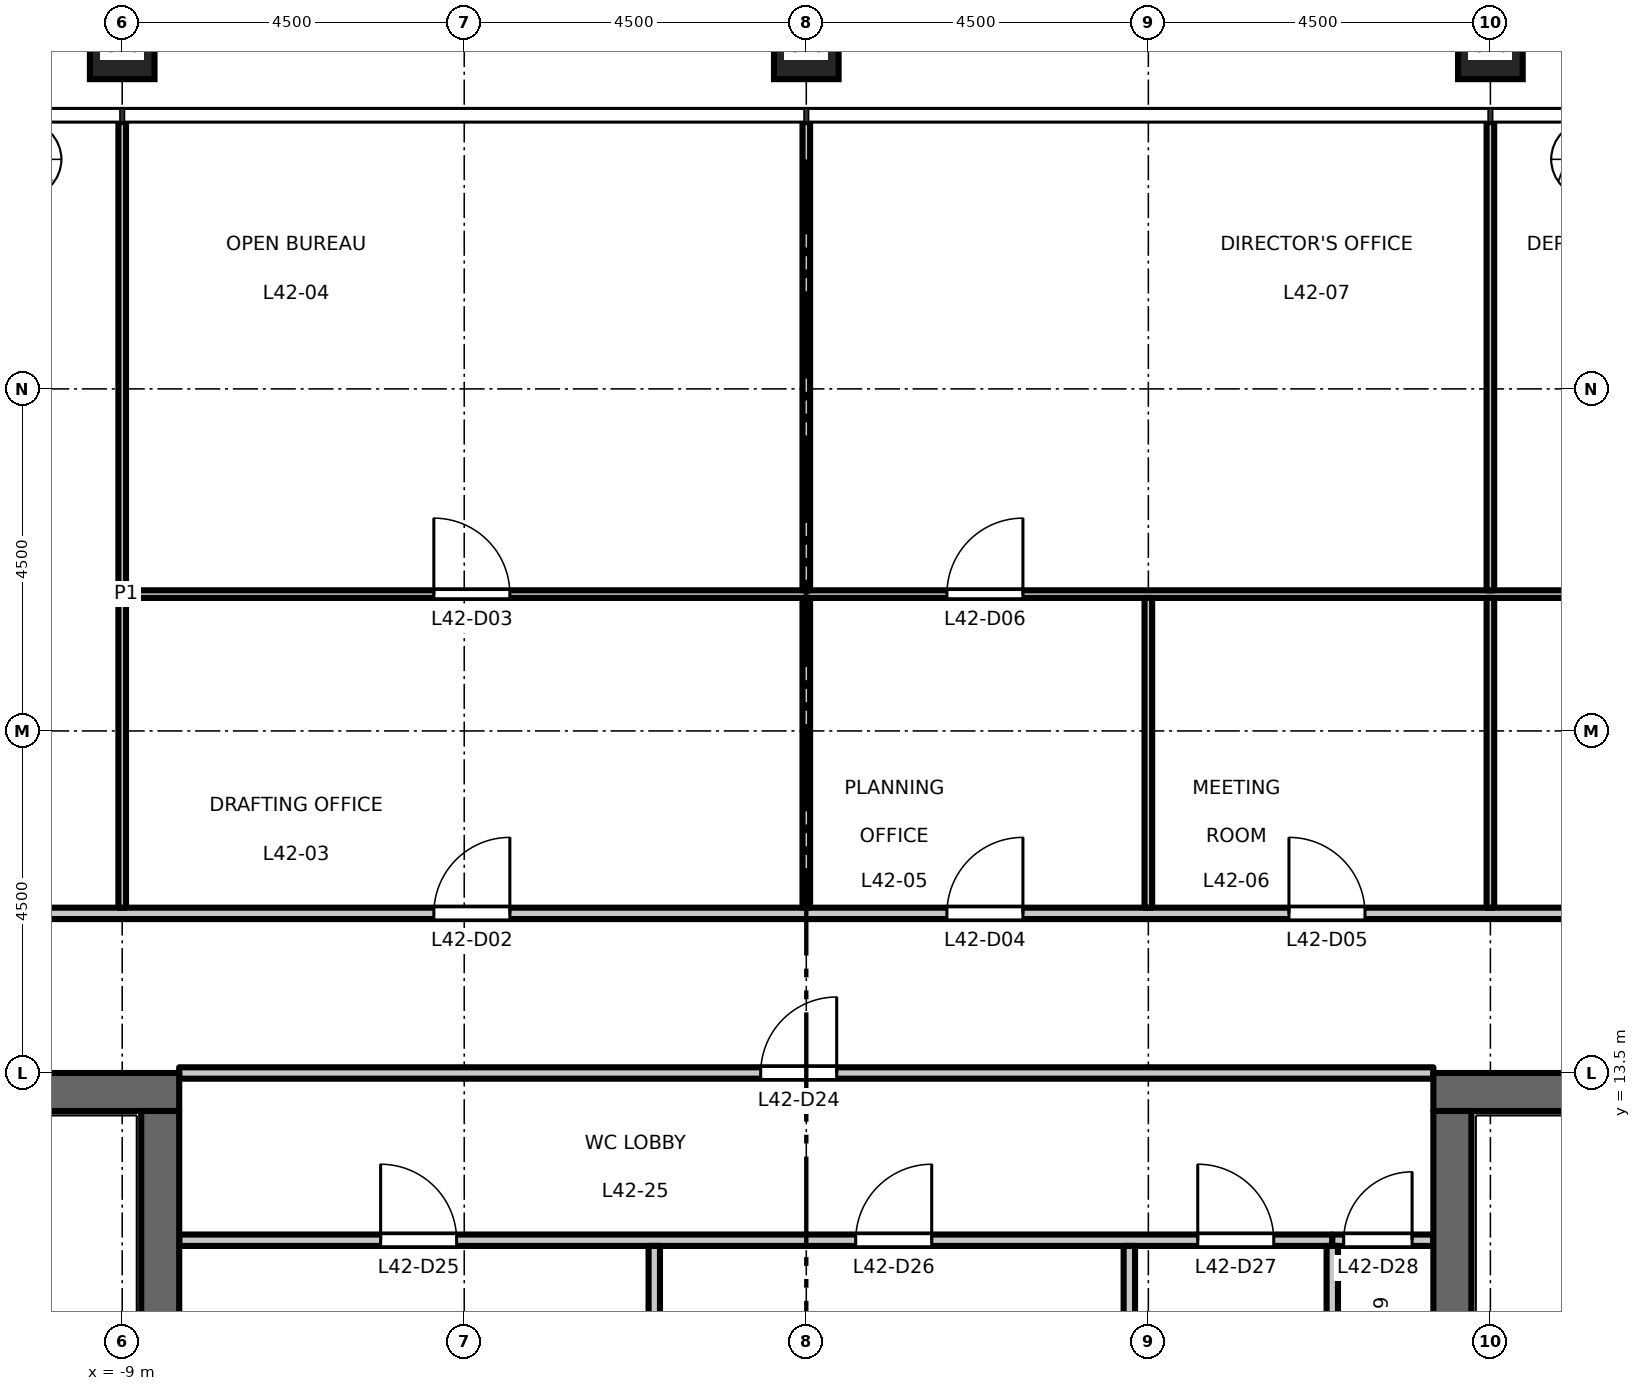
"""IFC4 building model, lengths in metres.
Left out: names, types, materials, properties, quantities, classifications, styles, units other than length and angle.
Written with IfcOpenShell. Run it as: python <this file> out.ifc"""

import sys

from ifc_helpers import new_model, si_unit, direction, frame, frame_2d, origin, origin_2d, place, context, subcontext, project, spatial, rectangle, hollow_rectangle, extrude, element, fill, save


model = new_model("IFC4")
c1 = context("Model", 3, precision=1e-05, world=origin(), true_north=direction((0.0, 1.0)))
c2 = subcontext(c1, "Body", "Model", "MODEL_VIEW")
j1 = project(units=[si_unit("LENGTHUNIT", "METRE"), si_unit("PLANEANGLEUNIT", "RADIAN")], contexts=[c1])
p1 = place(None, origin())
s1 = spatial("IfcSite", under=j1, at=p1, CompositionType="ELEMENT")
p2 = place(p1, origin())
s2 = spatial("IfcBuilding", under=s1, at=p2, CompositionType="ELEMENT")
p3 = place(p2, frame((0.0, 0.0, 197.2)))
s3 = spatial("IfcBuildingStorey", under=s2, at=p3, CompositionType="ELEMENT", Elevation=197.2)
for number, where, z_axis, x_axis in (
    (1, (9.0, 27.0, 0.0), (0.0, 0.0, 1.0), (1.0, 0.0, 0.0)),
    (2, (0.0, 27.0, 0.0), (0.0, 0.0, 1.0), (1.0, 0.0, 0.0)),
    (3, (-9.0, 27.0, 0.0), (0.0, 0.0, 1.0), (1.0, 0.0, 0.0)),
):
    element("IfcColumn", number, at=place(p3, frame(where, z_axis=z_axis, x_axis=x_axis)), inside=s3, PredefinedType="COLUMN", context=c2, shape_type="SweptSolid", body=[
        extrude(hollow_rectangle(XDim=0.85, YDim=0.85, WallThickness=0.05, at=origin_2d()), origin(), (0.0, 0.0, 1.0), 4.5),
    ])
p4 = place(p3, frame((-8.25, 13.25, 0.0), z_axis=(0.0, 0.0, 1.0), x_axis=(-1.0, 0.0, 0.0)))
e4 = element("IfcWall", 4, at=p4, inside=s3, PredefinedType="SHEAR", context=c2, shape_type="SweptSolid", body=[
    extrude(rectangle(XDim=13.5, YDim=0.5, at=frame_2d((6.75, 0.0))), origin(), (0.0, 0.0, 1.0), 4.35),
])
p5 = place(p3, frame((-8.5, -13.0, 0.0), z_axis=(0.0, 0.0, 1.0), x_axis=(0.0, 1.0, 0.0)))
e5 = element("IfcWall", 5, at=p5, inside=s3, PredefinedType="SHEAR", context=c2, shape_type="SweptSolid", body=[
    extrude(rectangle(XDim=26.0, YDim=0.5, at=frame_2d((13.0, 0.0))), origin(), (0.0, 0.0, 1.0), 4.35),
])
p6 = place(p3, frame((8.25, 13.25, 0.0), z_axis=(0.0, 0.0, 1.0), x_axis=(1.0, 0.0, 0.0)))
e6 = element("IfcWall", 6, at=p6, inside=s3, PredefinedType="SHEAR", context=c2, shape_type="SweptSolid", body=[
    extrude(rectangle(XDim=13.5, YDim=0.5, at=frame_2d((6.75, 0.0))), origin(), (0.0, 0.0, 1.0), 4.35),
])
p7 = place(p3, frame((8.5, -13.0, 0.0), z_axis=(0.0, 0.0, 1.0), x_axis=(0.0, 1.0, 0.0)))
e7 = element("IfcWall", 7, at=p7, inside=s3, PredefinedType="SHEAR", context=c2, shape_type="SweptSolid", body=[
    extrude(rectangle(XDim=26.0, YDim=0.5, at=frame_2d((13.0, 0.0))), origin(), (0.0, 0.0, 1.0), 4.35),
])
p8 = place(p3, frame((-8.25, 11.3, 0.0), z_axis=(0.0, 0.0, 1.0), x_axis=(1.0, 0.0, 0.0)))
e8 = element("IfcWall", 8, at=p8, inside=s3, PredefinedType="PARTITIONING", context=c2, shape_type="SweptSolid", body=[
    extrude(rectangle(XDim=15.17, YDim=0.15, at=frame_2d((7.585, 0.0))), origin(), (0.0, 0.0, 1.0), 4.35),
])
p9 = place(p8, frame((2.65, 0.0, 0.0)))
e9 = element("IfcOpeningElement", 9, at=p9, cuts=e8, PredefinedType="OPENING", context=c2, shape_type="SweptSolid", body=[
    extrude(rectangle(XDim=1.0, YDim=2.1, at=frame_2d((0.5, 1.05))), frame((0.0, 0.085, 0.0), z_axis=(0.0, -1.0, 0.0), x_axis=(1.0, 0.0, 0.0)), (0.0, 0.0, 1.0), 0.17),
])
p10 = place(p8, frame((8.9, 0.0, 0.0)))
e10 = element("IfcOpeningElement", 10, at=p10, cuts=e8, PredefinedType="OPENING", context=c2, shape_type="SweptSolid", body=[
    extrude(rectangle(XDim=1.0, YDim=2.1, at=frame_2d((0.5, 1.05))), frame((0.0, 0.085, 0.0), z_axis=(0.0, -1.0, 0.0), x_axis=(1.0, 0.0, 0.0)), (0.0, 0.0, 1.0), 0.17),
])
p11 = place(p8, frame((13.4, 0.0, 0.0)))
e11 = element("IfcOpeningElement", 11, at=p11, cuts=e8, PredefinedType="OPENING", context=c2, shape_type="SweptSolid", body=[
    extrude(rectangle(XDim=1.0, YDim=2.1, at=frame_2d((0.5, 1.05))), frame((0.0, 0.085, 0.0), z_axis=(0.0, -1.0, 0.0), x_axis=(1.0, 0.0, 0.0)), (0.0, 0.0, 1.0), 0.17),
])
p12 = place(p3, frame((6.92, 11.3, 0.0), z_axis=(0.0, 0.0, 1.0), x_axis=(1.0, 0.0, 0.0)))
e12 = element("IfcWall", 12, at=p12, inside=s3, PredefinedType="PARTITIONING", context=c2, shape_type="SweptSolid", body=[
    extrude(rectangle(XDim=1.33, YDim=0.15, at=frame_2d((0.665, 0.0))), origin(), (0.0, 0.0, 1.0), 4.35),
])
p13 = place(p12, frame((0.15, 0.0, 0.0)))
e13 = element("IfcOpeningElement", 13, at=p13, cuts=e12, PredefinedType="OPENING", context=c2, shape_type="SweptSolid", body=[
    extrude(rectangle(XDim=0.9, YDim=2.1, at=frame_2d((0.45, 1.05))), frame((0.0, 0.085, 0.0), z_axis=(0.0, -1.0, 0.0), x_axis=(1.0, 0.0, 0.0)), (0.0, 0.0, 1.0), 0.17),
])
p14 = place(p3, frame((-8.25, 13.5, 0.0), z_axis=(0.0, 0.0, 1.0), x_axis=(1.0, 0.0, 0.0)))
e14 = element("IfcWall", 14, at=p14, inside=s3, PredefinedType="PARTITIONING", context=c2, shape_type="SweptSolid", body=[
    extrude(rectangle(XDim=16.5, YDim=0.15, at=frame_2d((8.25, 0.0))), origin(), (0.0, 0.0, 1.0), 4.35),
])
p15 = place(p14, frame((7.65, 0.0, 0.0)))
e15 = element("IfcOpeningElement", 15, at=p15, cuts=e14, PredefinedType="OPENING", context=c2, shape_type="SweptSolid", body=[
    extrude(rectangle(XDim=1.0, YDim=2.1, at=frame_2d((0.5, 1.05))), frame((0.0, 0.085, 0.0), z_axis=(0.0, -1.0, 0.0), x_axis=(1.0, 0.0, 0.0)), (0.0, 0.0, 1.0), 0.17),
])
p16 = place(p3, frame((-26.01, 15.6, 0.0), z_axis=(0.0, 0.0, 1.0), x_axis=(1.0, 0.0, 0.0)))
e16 = element("IfcWall", 16, at=p16, inside=s3, PredefinedType="PARTITIONING", context=c2, shape_type="SweptSolid", body=[
    extrude(rectangle(XDim=52.02, YDim=0.15, at=frame_2d((26.01, 0.0))), origin(), (0.0, 0.0, 1.0), 4.35),
])
p17 = place(p16, frame((12.11, 0.0, 0.0)))
e17 = element("IfcOpeningElement", 17, at=p17, cuts=e16, PredefinedType="OPENING", context=c2, shape_type="SweptSolid", body=[
    extrude(rectangle(XDim=1.0, YDim=2.1, at=frame_2d((0.5, 1.05))), frame((0.0, 0.085, 0.0), z_axis=(0.0, -1.0, 0.0), x_axis=(1.0, 0.0, 0.0)), (0.0, 0.0, 1.0), 0.17),
])
p18 = place(p16, frame((21.11, 0.0, 0.0)))
e18 = element("IfcOpeningElement", 18, at=p18, cuts=e16, PredefinedType="OPENING", context=c2, shape_type="SweptSolid", body=[
    extrude(rectangle(XDim=1.0, YDim=2.1, at=frame_2d((0.5, 1.05))), frame((0.0, 0.085, 0.0), z_axis=(0.0, -1.0, 0.0), x_axis=(1.0, 0.0, 0.0)), (0.0, 0.0, 1.0), 0.17),
])
p19 = place(p16, frame((27.86, 0.0, 0.0)))
e19 = element("IfcOpeningElement", 19, at=p19, cuts=e16, PredefinedType="OPENING", context=c2, shape_type="SweptSolid", body=[
    extrude(rectangle(XDim=1.0, YDim=2.1, at=frame_2d((0.5, 1.05))), frame((0.0, 0.085, 0.0), z_axis=(0.0, -1.0, 0.0), x_axis=(1.0, 0.0, 0.0)), (0.0, 0.0, 1.0), 0.17),
])
p20 = place(p16, frame((32.36, 0.0, 0.0)))
e20 = element("IfcOpeningElement", 20, at=p20, cuts=e16, PredefinedType="OPENING", context=c2, shape_type="SweptSolid", body=[
    extrude(rectangle(XDim=1.0, YDim=2.1, at=frame_2d((0.5, 1.05))), frame((0.0, 0.085, 0.0), z_axis=(0.0, -1.0, 0.0), x_axis=(1.0, 0.0, 0.0)), (0.0, 0.0, 1.0), 0.17),
])
p21 = place(p16, frame((39.11, 0.0, 0.0)))
e21 = element("IfcOpeningElement", 21, at=p21, cuts=e16, PredefinedType="OPENING", context=c2, shape_type="SweptSolid", body=[
    extrude(rectangle(XDim=1.0, YDim=2.1, at=frame_2d((0.5, 1.05))), frame((0.0, 0.085, 0.0), z_axis=(0.0, -1.0, 0.0), x_axis=(1.0, 0.0, 0.0)), (0.0, 0.0, 1.0), 0.17),
])
p22 = place(p16, frame((3.61, 0.0, 0.0)))
e22 = element("IfcOpeningElement", 22, at=p22, cuts=e16, PredefinedType="OPENING", context=c2, shape_type="SweptSolid", body=[
    extrude(rectangle(XDim=1.0, YDim=2.1, at=frame_2d((0.5, 1.05))), frame((0.0, 0.085, 0.0), z_axis=(0.0, -1.0, 0.0), x_axis=(1.0, 0.0, 0.0)), (0.0, 0.0, 1.0), 0.17),
])
p23 = place(p16, frame((47.62, 0.0, 0.0)))
e23 = element("IfcOpeningElement", 23, at=p23, cuts=e16, PredefinedType="OPENING", context=c2, shape_type="SweptSolid", body=[
    extrude(rectangle(XDim=1.0, YDim=2.1, at=frame_2d((0.5, 1.05))), frame((0.0, 0.085, 0.0), z_axis=(0.0, -1.0, 0.0), x_axis=(1.0, 0.0, 0.0)), (0.0, 0.0, 1.0), 0.17),
])
p24 = place(p3, frame((-8.95, 19.8, 0.0), z_axis=(0.0, 0.0, 1.0), x_axis=(1.0, 0.0, 0.0)))
e24 = element("IfcWall", 24, at=p24, inside=s3, PredefinedType="PARTITIONING", context=c2, shape_type="SweptSolid", body=[
    extrude(rectangle(XDim=34.133, YDim=0.1, at=frame_2d((17.066, 0.0))), origin(), (0.0, 0.0, 1.0), 4.35),
])
p25 = place(p24, frame((4.05, 0.0, 0.0)))
e25 = element("IfcOpeningElement", 25, at=p25, cuts=e24, PredefinedType="OPENING", context=c2, shape_type="SweptSolid", body=[
    extrude(rectangle(XDim=1.0, YDim=2.1, at=frame_2d((0.5, 1.05))), frame((0.0, 0.06, 0.0), z_axis=(0.0, -1.0, 0.0), x_axis=(1.0, 0.0, 0.0)), (0.0, 0.0, 1.0), 0.12),
])
p26 = place(p24, frame((10.8, 0.0, 0.0)))
e26 = element("IfcOpeningElement", 26, at=p26, cuts=e24, PredefinedType="OPENING", context=c2, shape_type="SweptSolid", body=[
    extrude(rectangle(XDim=1.0, YDim=2.1, at=frame_2d((0.5, 1.05))), frame((0.0, 0.06, 0.0), z_axis=(0.0, -1.0, 0.0), x_axis=(1.0, 0.0, 0.0)), (0.0, 0.0, 1.0), 0.12),
])
p27 = place(p24, frame((22.05, 0.0, 0.0)))
e27 = element("IfcOpeningElement", 27, at=p27, cuts=e24, PredefinedType="OPENING", context=c2, shape_type="SweptSolid", body=[
    extrude(rectangle(XDim=1.0, YDim=2.1, at=frame_2d((0.5, 1.05))), frame((0.0, 0.06, 0.0), z_axis=(0.0, -1.0, 0.0), x_axis=(1.0, 0.0, 0.0)), (0.0, 0.0, 1.0), 0.12),
])
p28 = place(p24, frame((29.983, 0.0, 0.0)))
e28 = element("IfcOpeningElement", 28, at=p28, cuts=e24, PredefinedType="OPENING", context=c2, shape_type="SweptSolid", body=[
    extrude(rectangle(XDim=1.0, YDim=2.1, at=frame_2d((0.5, 1.05))), frame((0.0, 0.06, 0.0), z_axis=(0.0, -1.0, 0.0), x_axis=(1.0, 0.0, 0.0)), (0.0, 0.0, 1.0), 0.12),
])
p29 = place(p3, frame((-9.0, 15.675, 0.0), z_axis=(0.0, 0.0, 1.0), x_axis=(0.0, 1.0, 0.0)))
e29 = element("IfcWall", 29, at=p29, inside=s3, PredefinedType="PARTITIONING", context=c2, shape_type="SweptSolid", body=[
    extrude(rectangle(XDim=10.335, YDim=0.1, at=frame_2d((5.167, 0.0))), origin(), (0.0, 0.0, 1.0), 3.65),
])
p30 = place(p3, frame((-2.0, 8.37, 0.0), z_axis=(0.0, 0.0, 1.0), x_axis=(0.0, 1.0, 0.0)))
e30 = element("IfcWall", 30, at=p30, inside=s3, PredefinedType="PARTITIONING", context=c2, shape_type="SweptSolid", body=[
    extrude(rectangle(XDim=2.855, YDim=0.15, at=frame_2d((1.427, 0.0))), origin(), (0.0, 0.0, 1.0), 4.35),
])
p31 = place(p3, frame((0.0, 15.675, 0.0), z_axis=(0.0, 0.0, 1.0), x_axis=(0.0, 1.0, 0.0)))
e31 = element("IfcWall", 31, at=p31, inside=s3, PredefinedType="PARTITIONING", context=c2, shape_type="SweptSolid", body=[
    extrude(rectangle(XDim=4.075, YDim=0.1, at=frame_2d((2.038, 0.0))), origin(), (0.0, 0.0, 1.0), 3.55),
])
p32 = place(p3, frame((0.0, 19.85, 0.0), z_axis=(0.0, 0.0, 1.0), x_axis=(0.0, 1.0, 0.0)))
e32 = element("IfcWall", 32, at=p32, inside=s3, PredefinedType="PARTITIONING", context=c2, shape_type="SweptSolid", body=[
    extrude(rectangle(XDim=6.16, YDim=0.1, at=frame_2d((3.08, 0.0))), origin(), (0.0, 0.0, 1.0), 3.55),
])
p33 = place(p3, frame((4.25, 8.37, 0.0), z_axis=(0.0, 0.0, 1.0), x_axis=(0.0, 1.0, 0.0)))
e33 = element("IfcWall", 33, at=p33, inside=s3, PredefinedType="PARTITIONING", context=c2, shape_type="SweptSolid", body=[
    extrude(rectangle(XDim=2.855, YDim=0.15, at=frame_2d((1.427, 0.0))), origin(), (0.0, 0.0, 1.0), 4.35),
])
p34 = place(p3, frame((4.5, 15.675, 0.0), z_axis=(0.0, 0.0, 1.0), x_axis=(0.0, 1.0, 0.0)))
e34 = element("IfcWall", 34, at=p34, inside=s3, PredefinedType="PARTITIONING", context=c2, shape_type="SweptSolid", body=[
    extrude(rectangle(XDim=4.075, YDim=0.1, at=frame_2d((2.038, 0.0))), origin(), (0.0, 0.0, 1.0), 4.35),
])
p35 = place(p3, frame((6.92, 8.029, 0.0), z_axis=(0.0, 0.0, 1.0), x_axis=(0.0, 1.0, 0.0)))
e35 = element("IfcWall", 35, at=p35, inside=s3, PredefinedType="PARTITIONING", context=c2, shape_type="SweptSolid", body=[
    extrude(rectangle(XDim=3.196, YDim=0.15, at=frame_2d((1.598, 0.0))), origin(), (0.0, 0.0, 1.0), 4.35),
])
p36 = place(p3, frame((9.0, 15.675, 0.0), z_axis=(0.0, 0.0, 1.0), x_axis=(0.0, 1.0, 0.0)))
e36 = element("IfcWall", 36, at=p36, inside=s3, PredefinedType="PARTITIONING", context=c2, shape_type="SweptSolid", body=[
    extrude(rectangle(XDim=4.075, YDim=0.1, at=frame_2d((2.038, 0.0))), origin(), (0.0, 0.0, 1.0), 3.65),
])
p37 = place(p3, frame((9.0, 19.85, 0.0), z_axis=(0.0, 0.0, 1.0), x_axis=(0.0, 1.0, 0.0)))
e37 = element("IfcWall", 37, at=p37, inside=s3, PredefinedType="PARTITIONING", context=c2, shape_type="SweptSolid", body=[
    extrude(rectangle(XDim=6.16, YDim=0.1, at=frame_2d((3.08, 0.0))), origin(), (0.0, 0.0, 1.0), 3.65),
])
p38 = place(p18, origin())
e38 = element("IfcDoor", 38, at=p38, inside=s3, OperationType="SINGLE_SWING_RIGHT", PredefinedType="DOOR", context=c2, shape_type="SweptSolid", body=[
    extrude(rectangle(XDim=1.0, YDim=2.1, at=frame_2d((0.5, 1.05))), frame((0.0, 0.025, 0.0), z_axis=(0.0, -1.0, 0.0), x_axis=(1.0, 0.0, 0.0)), (0.0, 0.0, 1.0), 0.05),
])
fill(e18, e38)
p39 = place(p25, origin())
e39 = element("IfcDoor", 39, at=p39, inside=s3, OperationType="SINGLE_SWING_LEFT", PredefinedType="DOOR", context=c2, shape_type="SweptSolid", body=[
    extrude(rectangle(XDim=1.0, YDim=2.1, at=frame_2d((0.5, 1.05))), frame((0.0, 0.025, 0.0), z_axis=(0.0, -1.0, 0.0), x_axis=(1.0, 0.0, 0.0)), (0.0, 0.0, 1.0), 0.05),
])
fill(e25, e39)
p40 = place(p19, origin())
e40 = element("IfcDoor", 40, at=p40, inside=s3, OperationType="SINGLE_SWING_RIGHT", PredefinedType="DOOR", context=c2, shape_type="SweptSolid", body=[
    extrude(rectangle(XDim=1.0, YDim=2.1, at=frame_2d((0.5, 1.05))), frame((0.0, 0.025, 0.0), z_axis=(0.0, -1.0, 0.0), x_axis=(1.0, 0.0, 0.0)), (0.0, 0.0, 1.0), 0.05),
])
fill(e19, e40)
p41 = place(p20, origin())
e41 = element("IfcDoor", 41, at=p41, inside=s3, OperationType="SINGLE_SWING_LEFT", PredefinedType="DOOR", context=c2, shape_type="SweptSolid", body=[
    extrude(rectangle(XDim=1.0, YDim=2.1, at=frame_2d((0.5, 1.05))), frame((0.0, 0.025, 0.0), z_axis=(0.0, -1.0, 0.0), x_axis=(1.0, 0.0, 0.0)), (0.0, 0.0, 1.0), 0.05),
])
fill(e20, e41)
p42 = place(p26, origin())
e42 = element("IfcDoor", 42, at=p42, inside=s3, OperationType="SINGLE_SWING_RIGHT", PredefinedType="DOOR", context=c2, shape_type="SweptSolid", body=[
    extrude(rectangle(XDim=1.0, YDim=2.1, at=frame_2d((0.5, 1.05))), frame((0.0, 0.025, 0.0), z_axis=(0.0, -1.0, 0.0), x_axis=(1.0, 0.0, 0.0)), (0.0, 0.0, 1.0), 0.05),
])
fill(e26, e42)
p43 = place(p15, origin())
e43 = element("IfcDoor", 43, at=p43, inside=s3, OperationType="SINGLE_SWING_RIGHT", PredefinedType="DOOR", context=c2, shape_type="SweptSolid", body=[
    extrude(rectangle(XDim=1.0, YDim=2.1, at=frame_2d((0.5, 1.05))), frame((0.0, 0.025, 0.0), z_axis=(0.0, -1.0, 0.0), x_axis=(1.0, 0.0, 0.0)), (0.0, 0.0, 1.0), 0.05),
])
fill(e15, e43)
p44 = place(p9, origin())
e44 = element("IfcDoor", 44, at=p44, inside=s3, OperationType="SINGLE_SWING_LEFT", PredefinedType="DOOR", context=c2, shape_type="SweptSolid", body=[
    extrude(rectangle(XDim=1.0, YDim=2.1, at=frame_2d((0.5, 1.05))), frame((0.0, 0.025, 0.0), z_axis=(0.0, -1.0, 0.0), x_axis=(1.0, 0.0, 0.0)), (0.0, 0.0, 1.0), 0.05),
])
fill(e9, e44)
p45 = place(p10, origin())
e45 = element("IfcDoor", 45, at=p45, inside=s3, OperationType="SINGLE_SWING_RIGHT", PredefinedType="DOOR", context=c2, shape_type="SweptSolid", body=[
    extrude(rectangle(XDim=1.0, YDim=2.1, at=frame_2d((0.5, 1.05))), frame((0.0, 0.025, 0.0), z_axis=(0.0, -1.0, 0.0), x_axis=(1.0, 0.0, 0.0)), (0.0, 0.0, 1.0), 0.05),
])
fill(e10, e45)
p46 = place(p11, origin())
e46 = element("IfcDoor", 46, at=p46, inside=s3, OperationType="SINGLE_SWING_LEFT", PredefinedType="DOOR", context=c2, shape_type="SweptSolid", body=[
    extrude(rectangle(XDim=1.0, YDim=2.1, at=frame_2d((0.5, 1.05))), frame((0.0, 0.025, 0.0), z_axis=(0.0, -1.0, 0.0), x_axis=(1.0, 0.0, 0.0)), (0.0, 0.0, 1.0), 0.05),
])
fill(e11, e46)
p47 = place(p13, origin())
e47 = element("IfcDoor", 47, at=p47, inside=s3, OperationType="SINGLE_SWING_RIGHT", PredefinedType="DOOR", context=c2, shape_type="SweptSolid", body=[
    extrude(rectangle(XDim=0.9, YDim=2.1, at=frame_2d((0.45, 1.05))), frame((0.0, 0.025, 0.0), z_axis=(0.0, -1.0, 0.0), x_axis=(1.0, 0.0, 0.0)), (0.0, 0.0, 1.0), 0.05),
])
fill(e13, e47)
save(model, sys.argv[1])
